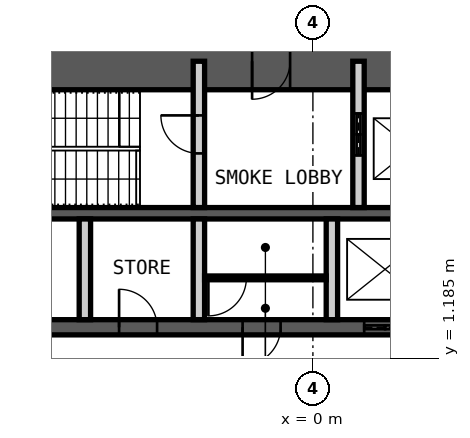
"""IFC4 building model, lengths in metres.
Left out: names, types, materials, properties, quantities, classifications, styles, units other than length and angle.
Written with IfcOpenShell. Run it as: python <this file> out.ifc"""

import sys

from ifc_helpers import new_model, si_unit, direction, frame, frame_2d, origin, place, context, subcontext, project, spatial, rectangle, extrude, element, fill, save


model = new_model("IFC4")
c1 = context("Model", 3, precision=1e-05, world=origin(), true_north=direction((0.0, 1.0)))
c2 = subcontext(c1, "Body", "Model", "MODEL_VIEW")
j1 = project(units=[si_unit("LENGTHUNIT", "METRE"), si_unit("PLANEANGLEUNIT", "RADIAN")], contexts=[c1])
p1 = place(None, origin())
s1 = spatial("IfcSite", under=j1, at=p1, CompositionType="ELEMENT")
p2 = place(p1, origin())
s2 = spatial("IfcBuilding", under=s1, at=p2, CompositionType="ELEMENT")
p3 = place(p2, frame((0.0, 0.0, 132.4)))
s3 = spatial("IfcBuildingStorey", under=s2, at=p3, CompositionType="ELEMENT", Elevation=132.4)
p4 = place(p3, frame((-12.0, 9.0, 0.0), z_axis=(0.0, 0.0, 1.0), x_axis=(1.0, 0.0, 0.0)))
e1 = element("IfcWall", 1, at=p4, inside=s3, PredefinedType="SHEAR", context=c2, shape_type="SweptSolid", body=[
    extrude(rectangle(XDim=24.0, YDim=1.5, at=frame_2d((12.0, 0.0))), origin(), (0.0, 0.0, 1.0), 4.2),
])
p5 = place(p4, frame((10.4, 0.0, 0.0)))
e2 = element("IfcOpeningElement", 2, at=p5, cuts=e1, PredefinedType="OPENING", context=c2, shape_type="SweptSolid", body=[
    extrude(rectangle(XDim=1.0, YDim=2.1, at=frame_2d((0.5, 1.05))), frame((0.0, 0.76, 0.0), z_axis=(0.0, -1.0, 0.0), x_axis=(1.0, 0.0, 0.0)), (0.0, 0.0, 1.0), 1.52),
])
p6 = place(p4, frame((17.6, 0.0, 0.0)))
e3 = element("IfcOpeningElement", 3, at=p6, cuts=e1, PredefinedType="OPENING", context=c2, shape_type="SweptSolid", body=[
    extrude(rectangle(XDim=0.9, YDim=2.1, at=frame_2d((0.45, 1.05))), frame((0.0, 0.76, 0.0), z_axis=(0.0, -1.0, 0.0), x_axis=(1.0, 0.0, 0.0)), (0.0, 0.0, 1.0), 1.52),
])
p7 = place(p4, frame((21.9, 0.0, 0.0)))
e4 = element("IfcOpeningElement", 4, at=p7, cuts=e1, PredefinedType="OPENING", context=c2, shape_type="SweptSolid", body=[
    extrude(rectangle(XDim=0.9, YDim=2.1, at=frame_2d((0.45, 1.05))), frame((0.0, 0.76, 0.0), z_axis=(0.0, -1.0, 0.0), x_axis=(1.0, 0.0, 0.0)), (0.0, 0.0, 1.0), 1.52),
])
p8 = place(p3, frame((-12.0, 5.0, 0.0), z_axis=(0.0, 0.0, 1.0), x_axis=(1.0, 0.0, 0.0)))
e5 = element("IfcWall", 5, at=p8, inside=s3, PredefinedType="SHEAR", context=c2, shape_type="SweptSolid", body=[
    extrude(rectangle(XDim=24.0, YDim=0.3, at=frame_2d((12.0, 0.0))), origin(), (0.0, 0.0, 1.0), 4.2),
])
p9 = place(p3, frame((-12.0, 2.0, 0.0), z_axis=(0.0, 0.0, 1.0), x_axis=(1.0, 0.0, 0.0)))
e6 = element("IfcWall", 6, at=p9, inside=s3, PredefinedType="SHEAR", context=c2, shape_type="SweptSolid", body=[
    extrude(rectangle(XDim=24.0, YDim=0.4, at=frame_2d((12.0, 0.0))), origin(), (0.0, 0.0, 1.0), 4.2),
])
p10 = place(p9, frame((2.4, 0.0, 0.0)))
e7 = element("IfcOpeningElement", 7, at=p10, cuts=e6, PredefinedType="OPENING", context=c2, shape_type="SweptSolid", body=[
    extrude(rectangle(XDim=1.1, YDim=2.1, at=frame_2d((0.55, 1.05))), frame((0.0, 0.21, 0.0), z_axis=(0.0, -1.0, 0.0), x_axis=(1.0, 0.0, 0.0)), (0.0, 0.0, 1.0), 0.42),
])
p11 = place(p9, frame((22.0, 0.0, 0.0)))
e8 = element("IfcOpeningElement", 8, at=p11, cuts=e6, PredefinedType="OPENING", context=c2, shape_type="SweptSolid", body=[
    extrude(rectangle(XDim=1.1, YDim=2.1, at=frame_2d((0.55, 1.05))), frame((0.0, 0.21, 0.0), z_axis=(0.0, -1.0, 0.0), x_axis=(1.0, 0.0, 0.0)), (0.0, 0.0, 1.0), 0.42),
])
p12 = place(p9, frame((10.15, 0.0, 0.0)))
e9 = element("IfcOpeningElement", 9, at=p12, cuts=e6, PredefinedType="OPENING", context=c2, shape_type="SweptSolid", body=[
    extrude(rectangle(XDim=1.0, YDim=2.1, at=frame_2d((0.5, 1.05))), frame((0.0, 0.21, 0.0), z_axis=(0.0, -1.0, 0.0), x_axis=(1.0, 0.0, 0.0)), (0.0, 0.0, 1.0), 0.42),
])
p13 = place(p9, frame((6.9, 0.0, 0.0)))
e10 = element("IfcOpeningElement", 10, at=p13, cuts=e6, PredefinedType="OPENING", context=c2, shape_type="SweptSolid", body=[
    extrude(rectangle(XDim=1.0, YDim=2.1, at=frame_2d((0.5, 1.05))), frame((0.0, 0.21, 0.0), z_axis=(0.0, -1.0, 0.0), x_axis=(1.0, 0.0, 0.0)), (0.0, 0.0, 1.0), 0.42),
])
p14 = place(p9, frame((13.35, 0.0, 0.0)))
e11 = element("IfcOpeningElement", 11, at=p14, cuts=e6, PredefinedType="OPENING", context=c2, shape_type="SweptSolid", body=[
    extrude(rectangle(XDim=1.1, YDim=2.4, at=frame_2d((0.55, 1.2))), frame((0.0, 0.21, 0.0), z_axis=(0.0, -1.0, 0.0), x_axis=(1.0, 0.0, 0.0)), (0.0, 0.0, 1.0), 0.42),
])
p15 = place(p9, frame((16.15, 0.0, 0.0)))
e12 = element("IfcOpeningElement", 12, at=p15, cuts=e6, PredefinedType="OPENING", context=c2, shape_type="SweptSolid", body=[
    extrude(rectangle(XDim=1.1, YDim=2.4, at=frame_2d((0.55, 1.2))), frame((0.0, 0.21, 0.0), z_axis=(0.0, -1.0, 0.0), x_axis=(1.0, 0.0, 0.0)), (0.0, 0.0, 1.0), 0.42),
])
p16 = place(p9, frame((18.95, 0.0, 0.0)))
e13 = element("IfcOpeningElement", 13, at=p16, cuts=e6, PredefinedType="OPENING", context=c2, shape_type="SweptSolid", body=[
    extrude(rectangle(XDim=1.1, YDim=2.4, at=frame_2d((0.55, 1.2))), frame((0.0, 0.21, 0.0), z_axis=(0.0, -1.0, 0.0), x_axis=(1.0, 0.0, 0.0)), (0.0, 0.0, 1.0), 0.42),
])
p17 = place(p3, frame((-3.0, 5.15, 0.0), z_axis=(0.0, 0.0, 1.0), x_axis=(0.0, 1.0, 0.0)))
e14 = element("IfcWall", 14, at=p17, inside=s3, PredefinedType="PARTITIONING", context=c2, shape_type="SweptSolid", body=[
    extrude(rectangle(XDim=3.85, YDim=0.3, at=frame_2d((1.925, 0.0))), origin(), (0.0, 0.0, 1.0), 3.98),
])
p18 = place(p17, frame((1.425, 0.0, 0.0)))
e15 = element("IfcOpeningElement", 15, at=p18, cuts=e14, PredefinedType="OPENING", context=c2, shape_type="SweptSolid", body=[
    extrude(rectangle(XDim=1.0, YDim=2.1, at=frame_2d((0.5, 1.05))), frame((0.0, 0.16, 0.0), z_axis=(0.0, -1.0, 0.0), x_axis=(1.0, 0.0, 0.0)), (0.0, 0.0, 1.0), 0.32),
])
p19 = place(p3, frame((1.2, 5.15, 0.0), z_axis=(0.0, 0.0, 1.0), x_axis=(0.0, 1.0, 0.0)))
e16 = element("IfcWall", 16, at=p19, inside=s3, PredefinedType="PARTITIONING", context=c2, shape_type="SweptSolid", body=[
    extrude(rectangle(XDim=3.85, YDim=0.3, at=frame_2d((1.925, 0.0))), origin(), (0.0, 0.0, 1.0), 3.98),
])
p20 = place(p19, frame((1.375, 0.0, 0.0)))
e17 = element("IfcOpeningElement", 17, at=p20, cuts=e16, PredefinedType="OPENING", context=c2, shape_type="SweptSolid", body=[
    extrude(rectangle(XDim=1.1, YDim=2.4, at=frame_2d((0.55, 1.2))), frame((0.0, 0.16, 0.0), z_axis=(0.0, -1.0, 0.0), x_axis=(1.0, 0.0, 0.0)), (0.0, 0.0, 1.0), 0.32),
])
for number, where, z_axis, x_axis in (
    (18, (-6.0, 2.2, 0.0), (0.0, 0.0, 1.0), (0.0, 1.0, 0.0)),
    (19, (-3.0, 2.2, 0.0), (0.0, 0.0, 1.0), (0.0, 1.0, 0.0)),
    (20, (0.5, 2.2, 0.0), (0.0, 0.0, 1.0), (0.0, 1.0, 0.0)),
):
    element("IfcWall", number, at=place(p3, frame(where, z_axis=z_axis, x_axis=x_axis)), inside=s3, PredefinedType="PARTITIONING", context=c2, shape_type="SweptSolid", body=[
        extrude(rectangle(XDim=2.65, YDim=0.3, at=frame_2d((1.325, 0.0))), origin(), (0.0, 0.0, 1.0), 3.98),
    ])
p21 = place(p3, frame((-2.85, 3.3, 0.0), z_axis=(0.0, 0.0, 1.0), x_axis=(1.0, 0.0, 0.0)))
e21 = element("IfcWall", 21, at=p21, inside=s3, PredefinedType="PARTITIONING", context=c2, shape_type="SweptSolid", body=[
    extrude(rectangle(XDim=3.2, YDim=0.1, at=frame_2d((1.6, 0.0))), origin(), (0.0, 0.0, 1.0), 3.98),
])
p22 = place(p21, frame((0.1, 0.0, 0.0)))
e22 = element("IfcOpeningElement", 22, at=p22, cuts=e21, PredefinedType="OPENING", context=c2, shape_type="SweptSolid", body=[
    extrude(rectangle(XDim=1.0, YDim=2.4, at=frame_2d((0.5, 1.2))), frame((0.0, 0.06, 0.0), z_axis=(0.0, -1.0, 0.0), x_axis=(1.0, 0.0, 0.0)), (0.0, 0.0, 1.0), 0.12),
])
p23 = place(p5, origin())
e23 = element("IfcDoor", 23, at=p23, inside=s3, OperationType="SINGLE_SWING_LEFT", PredefinedType="DOOR", context=c2, shape_type="SweptSolid", body=[
    extrude(rectangle(XDim=1.0, YDim=2.1, at=frame_2d((0.5, 1.05))), frame((0.0, 0.025, 0.0), z_axis=(0.0, -1.0, 0.0), x_axis=(1.0, 0.0, 0.0)), (0.0, 0.0, 1.0), 0.05),
])
fill(e2, e23)
p24 = place(p18, origin())
e24 = element("IfcDoor", 24, at=p24, inside=s3, OperationType="SINGLE_SWING_LEFT", PredefinedType="DOOR", context=c2, shape_type="SweptSolid", body=[
    extrude(rectangle(XDim=1.0, YDim=2.1, at=frame_2d((0.5, 1.05))), frame((0.0, 0.025, 0.0), z_axis=(0.0, -1.0, 0.0), x_axis=(1.0, 0.0, 0.0)), (0.0, 0.0, 1.0), 0.05),
])
fill(e15, e24)
p25 = place(p12, origin())
e25 = element("IfcDoor", 25, at=p25, inside=s3, OperationType="SINGLE_SWING_LEFT", PredefinedType="DOOR", context=c2, shape_type="SweptSolid", body=[
    extrude(rectangle(XDim=1.0, YDim=2.1, at=frame_2d((0.5, 1.05))), frame((0.0, 0.025, 0.0), z_axis=(0.0, -1.0, 0.0), x_axis=(1.0, 0.0, 0.0)), (0.0, 0.0, 1.0), 0.05),
])
fill(e9, e25)
p26 = place(p20, origin())
e26 = element("IfcDoor", 26, at=p26, inside=s3, OperationType="DOUBLE_DOOR_SLIDING", PredefinedType="DOOR", context=c2, shape_type="SweptSolid", body=[
    extrude(rectangle(XDim=1.1, YDim=2.4, at=frame_2d((0.55, 1.2))), frame((0.0, 0.025, 0.0), z_axis=(0.0, -1.0, 0.0), x_axis=(1.0, 0.0, 0.0)), (0.0, 0.0, 1.0), 0.05),
])
fill(e17, e26)
p27 = place(p13, origin())
e27 = element("IfcDoor", 27, at=p27, inside=s3, OperationType="SINGLE_SWING_RIGHT", PredefinedType="DOOR", context=c2, shape_type="SweptSolid", body=[
    extrude(rectangle(XDim=1.0, YDim=2.1, at=frame_2d((0.5, 1.05))), frame((0.0, 0.025, 0.0), z_axis=(0.0, -1.0, 0.0), x_axis=(1.0, 0.0, 0.0)), (0.0, 0.0, 1.0), 0.05),
])
fill(e10, e27)
p28 = place(p14, origin())
e28 = element("IfcDoor", 28, at=p28, inside=s3, OperationType="DOUBLE_DOOR_SLIDING", PredefinedType="DOOR", context=c2, shape_type="SweptSolid", body=[
    extrude(rectangle(XDim=1.1, YDim=2.4, at=frame_2d((0.55, 1.2))), frame((0.0, 0.025, 0.0), z_axis=(0.0, -1.0, 0.0), x_axis=(1.0, 0.0, 0.0)), (0.0, 0.0, 1.0), 0.05),
])
fill(e11, e28)
p29 = place(p22, origin())
e29 = element("IfcDoor", 29, at=p29, inside=s3, OperationType="SINGLE_SWING_LEFT", PredefinedType="DOOR", context=c2, shape_type="SweptSolid", body=[
    extrude(rectangle(XDim=1.0, YDim=2.4, at=frame_2d((0.5, 1.2))), frame((0.0, 0.025, 0.0), z_axis=(0.0, -1.0, 0.0), x_axis=(1.0, 0.0, 0.0)), (0.0, 0.0, 1.0), 0.05),
])
fill(e22, e29)
save(model, sys.argv[1])
